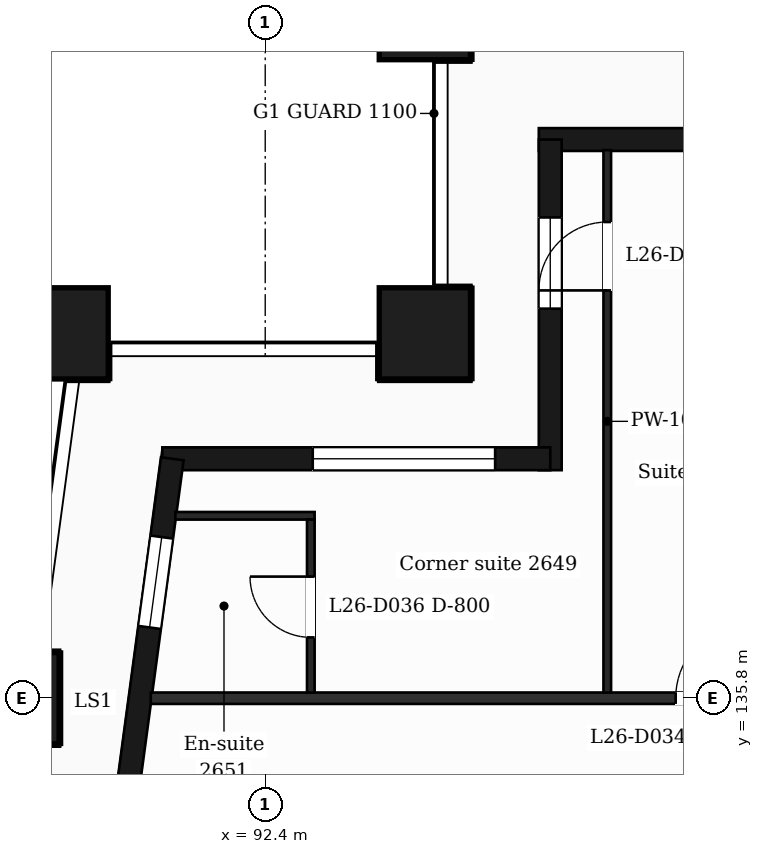
"""IFC4 building model, lengths in metres.
Left out: names, types, materials, properties, quantities, classifications, styles, units other than length and angle.
Written with IfcOpenShell. Run it as: python <this file> out.ifc"""

import sys

from ifc_helpers import new_model, si_unit, direction, frame, frame_2d, origin, origin_2d, place, context, subcontext, project, spatial, rectangle, extrude, element, fill, save


model = new_model("IFC4")
c1 = context("Model", 3, precision=1e-05, world=origin(), true_north=direction((0.0, 1.0)))
c2 = subcontext(c1, "Body", "Model", "MODEL_VIEW")
j1 = project(units=[si_unit("LENGTHUNIT", "METRE"), si_unit("PLANEANGLEUNIT", "RADIAN")], contexts=[c1])
p1 = place(None, origin())
s1 = spatial("IfcSite", under=j1, at=p1, CompositionType="ELEMENT")
p2 = place(p1, origin())
s2 = spatial("IfcBuilding", under=s1, at=p2, CompositionType="ELEMENT")
p3 = place(p2, frame((0.0, 0.0, 113.2)))
s3 = spatial("IfcBuildingStorey", under=s2, at=p3, CompositionType="ELEMENT", Elevation=113.2)
for number, where, z_axis, x_axis in (
    (1, (94.5, 140.6, 0.0), (0.0, 0.0, 1.0), (1.0, 0.0, 0.0)),
    (2, (89.735, 140.6, 0.0), (0.0, 0.0, 1.0), (1.0, 0.0, 0.0)),
    (3, (89.088, 135.8, 0.0), (0.0, 0.0, 1.0), (1.0, 0.0, 0.0)),
    (4, (94.5, 144.8, 0.0), (0.0, 0.0, 1.0), (1.0, 0.0, 0.0)),
):
    element("IfcColumn", number, at=place(p3, frame(where, z_axis=z_axis, x_axis=x_axis)), inside=s3, PredefinedType="COLUMN", context=c2, shape_type="SweptSolid", body=[
        extrude(rectangle(XDim=1.2, YDim=1.2, at=origin_2d()), origin(), (0.0, 0.0, 1.0), 3.7),
    ])
p4 = place(p3, frame((110.4, 143.15, 0.0), z_axis=(0.0, 0.0, 1.0), x_axis=(-1.0, 0.0, 0.0)))
e5 = element("IfcWall", 5, at=p4, inside=s3, PredefinedType="SOLIDWALL", context=c2, shape_type="SweptSolid", body=[
    extrude(rectangle(XDim=14.4, YDim=0.3, at=frame_2d((7.2, 0.0))), origin(), (0.0, 0.0, 1.0), 3.38),
])
p5 = place(p4, frame((2.1, 0.0, 0.9)))
e6 = element("IfcOpeningElement", 6, at=p5, cuts=e5, PredefinedType="OPENING", context=c2, shape_type="SweptSolid", body=[
    extrude(rectangle(XDim=2.4, YDim=2.1, at=frame_2d((1.2, 1.05))), frame((0.0, 0.16, 0.0), z_axis=(0.0, -1.0, 0.0), x_axis=(1.0, 0.0, 0.0)), (0.0, 0.0, 1.0), 0.32),
])
p6 = place(p4, frame((6.9, 0.0, 0.0)))
e7 = element("IfcOpeningElement", 7, at=p6, cuts=e5, PredefinedType="OPENING", context=c2, shape_type="SweptSolid", body=[
    extrude(rectangle(XDim=1.2, YDim=2.4, at=frame_2d((0.6, 1.2))), frame((0.0, 0.16, 0.0), z_axis=(0.0, -1.0, 0.0), x_axis=(1.0, 0.0, 0.0)), (0.0, 0.0, 1.0), 0.32),
])
p7 = place(p4, frame((11.1, 0.0, 0.9)))
e8 = element("IfcOpeningElement", 8, at=p7, cuts=e5, PredefinedType="OPENING", context=c2, shape_type="SweptSolid", body=[
    extrude(rectangle(XDim=1.2, YDim=2.1, at=frame_2d((0.6, 1.05))), frame((0.0, 0.16, 0.0), z_axis=(0.0, -1.0, 0.0), x_axis=(1.0, 0.0, 0.0)), (0.0, 0.0, 1.0), 0.32),
])
p8 = place(p3, frame((96.15, 143.15, 0.0), z_axis=(0.0, 0.0, 1.0), x_axis=(0.0, -1.0, 0.0)))
e9 = element("IfcWall", 9, at=p8, inside=s3, PredefinedType="SOLIDWALL", context=c2, shape_type="SweptSolid", body=[
    extrude(rectangle(XDim=4.35, YDim=0.3, at=frame_2d((2.175, 0.0))), origin(), (0.0, 0.0, 1.0), 3.38),
])
p9 = place(p8, frame((1.025, 0.0, 0.9)))
e10 = element("IfcOpeningElement", 10, at=p9, cuts=e9, PredefinedType="OPENING", context=c2, shape_type="SweptSolid", body=[
    extrude(rectangle(XDim=1.2, YDim=2.1, at=frame_2d((0.6, 1.05))), frame((0.0, 0.16, 0.0), z_axis=(0.0, -1.0, 0.0), x_axis=(1.0, 0.0, 0.0)), (0.0, 0.0, 1.0), 0.32),
])
p10 = place(p3, frame((96.15, 138.95, 0.0), z_axis=(0.0, 0.0, 1.0), x_axis=(-1.0, 0.0, 0.0)))
e11 = element("IfcWall", 11, at=p10, inside=s3, PredefinedType="SOLIDWALL", context=c2, shape_type="SweptSolid", body=[
    extrude(rectangle(XDim=5.104, YDim=0.3, at=frame_2d((2.552, 0.0))), origin(), (0.0, 0.0, 1.0), 3.38),
])
p11 = place(p10, frame((0.725, 0.0, 0.9)))
e12 = element("IfcOpeningElement", 12, at=p11, cuts=e11, PredefinedType="OPENING", context=c2, shape_type="SweptSolid", body=[
    extrude(rectangle(XDim=2.4, YDim=2.1, at=frame_2d((1.2, 1.05))), frame((0.0, 0.16, 0.0), z_axis=(0.0, -1.0, 0.0), x_axis=(1.0, 0.0, 0.0)), (0.0, 0.0, 1.0), 0.32),
])
p12 = place(p3, frame((91.177, 138.95, 0.0), z_axis=(0.0, 0.0, 1.0), x_axis=(-0.133426664613, -0.991058689065, 0.0)))
e13 = element("IfcWall", 13, at=p12, inside=s3, PredefinedType="SOLIDWALL", context=c2, shape_type="SweptSolid", body=[
    extrude(rectangle(XDim=6.609, YDim=0.3, at=frame_2d((3.305, 0.0))), origin(), (0.0, 0.0, 1.0), 3.38),
])
p13 = place(p12, frame((1.039, 0.0, 0.9)))
e14 = element("IfcOpeningElement", 14, at=p13, cuts=e13, PredefinedType="OPENING", context=c2, shape_type="SweptSolid", body=[
    extrude(rectangle(XDim=1.2, YDim=2.1, at=frame_2d((0.6, 1.05))), frame((0.0, 0.16, 0.0), z_axis=(0.0, -1.0, 0.0), x_axis=(1.0, 0.0, 0.0)), (0.0, 0.0, 1.0), 0.32),
])
p14 = place(p12, frame((4.294, 0.0, 0.0)))
e15 = element("IfcOpeningElement", 15, at=p14, cuts=e13, PredefinedType="OPENING", context=c2, shape_type="SweptSolid", body=[
    extrude(rectangle(XDim=1.2, YDim=2.4, at=frame_2d((0.6, 1.2))), frame((0.0, 0.16, 0.0), z_axis=(0.0, -1.0, 0.0), x_axis=(1.0, 0.0, 0.0)), (0.0, 0.0, 1.0), 0.32),
])
p15 = place(p3, frame((90.895, 135.8, 0.0), z_axis=(0.0, 0.0, 1.0), x_axis=(1.0, 0.0, 0.0)))
e16 = element("IfcWall", 16, at=p15, inside=s3, PredefinedType="PARTITIONING", context=c2, shape_type="SweptSolid", body=[
    extrude(rectangle(XDim=45.011, YDim=0.15, at=frame_2d((22.505, 0.0))), origin(), (0.0, 0.0, 1.0), 3.38),
])
p16 = place(p15, frame((6.906, 0.0, 0.0)))
e17 = element("IfcOpeningElement", 17, at=p16, cuts=e16, PredefinedType="OPENING", context=c2, shape_type="SweptSolid", body=[
    extrude(rectangle(XDim=1.0, YDim=2.1, at=frame_2d((0.5, 1.05))), frame((0.0, 0.085, 0.0), z_axis=(0.0, -1.0, 0.0), x_axis=(1.0, 0.0, 0.0)), (0.0, 0.0, 1.0), 0.17),
])
p17 = place(p15, frame((12.13, 0.0, 0.0)))
e18 = element("IfcOpeningElement", 18, at=p17, cuts=e16, PredefinedType="OPENING", context=c2, shape_type="SweptSolid", body=[
    extrude(rectangle(XDim=1.0, YDim=2.1, at=frame_2d((0.5, 1.05))), frame((0.0, 0.085, 0.0), z_axis=(0.0, -1.0, 0.0), x_axis=(1.0, 0.0, 0.0)), (0.0, 0.0, 1.0), 0.17),
])
p18 = place(p15, frame((23.48, 0.0, 0.0)))
e19 = element("IfcOpeningElement", 19, at=p18, cuts=e16, PredefinedType="OPENING", context=c2, shape_type="SweptSolid", body=[
    extrude(rectangle(XDim=1.0, YDim=2.1, at=frame_2d((0.5, 1.05))), frame((0.0, 0.085, 0.0), z_axis=(0.0, -1.0, 0.0), x_axis=(1.0, 0.0, 0.0)), (0.0, 0.0, 1.0), 0.17),
])
p19 = place(p15, frame((27.515, 0.0, 0.0)))
e20 = element("IfcOpeningElement", 20, at=p19, cuts=e16, PredefinedType="OPENING", context=c2, shape_type="SweptSolid", body=[
    extrude(rectangle(XDim=0.95, YDim=2.1, at=frame_2d((0.475, 1.05))), frame((0.0, 0.085, 0.0), z_axis=(0.0, -1.0, 0.0), x_axis=(1.0, 0.0, 0.0)), (0.0, 0.0, 1.0), 0.17),
])
p20 = place(p15, frame((31.18, 0.0, 0.0)))
e21 = element("IfcOpeningElement", 21, at=p20, cuts=e16, PredefinedType="OPENING", context=c2, shape_type="SweptSolid", body=[
    extrude(rectangle(XDim=0.95, YDim=2.1, at=frame_2d((0.475, 1.05))), frame((0.0, 0.085, 0.0), z_axis=(0.0, -1.0, 0.0), x_axis=(1.0, 0.0, 0.0)), (0.0, 0.0, 1.0), 0.17),
])
p21 = place(p15, frame((39.814, 0.0, 0.0)))
e22 = element("IfcOpeningElement", 22, at=p21, cuts=e16, PredefinedType="OPENING", context=c2, shape_type="SweptSolid", body=[
    extrude(rectangle(XDim=0.95, YDim=2.1, at=frame_2d((0.475, 1.05))), frame((0.0, 0.085, 0.0), z_axis=(0.0, -1.0, 0.0), x_axis=(1.0, 0.0, 0.0)), (0.0, 0.0, 1.0), 0.17),
])
p22 = place(p3, frame((91.218, 138.2, 0.0), z_axis=(0.0, 0.0, 1.0), x_axis=(1.0, 0.0, 0.0)))
e23 = element("IfcWall", 23, at=p22, inside=s3, PredefinedType="PARTITIONING", context=c2, shape_type="SweptSolid", body=[
    extrude(rectangle(XDim=1.832, YDim=0.1, at=frame_2d((0.916, 0.0))), origin(), (0.0, 0.0, 1.0), 3.38),
])
p23 = place(p3, frame((93.0, 135.875, 0.0), z_axis=(0.0, 0.0, 1.0), x_axis=(0.0, 1.0, 0.0)))
e24 = element("IfcWall", 24, at=p23, inside=s3, PredefinedType="PARTITIONING", context=c2, shape_type="SweptSolid", body=[
    extrude(rectangle(XDim=2.275, YDim=0.1, at=frame_2d((1.137, 0.0))), origin(), (0.0, 0.0, 1.0), 3.38),
])
p24 = place(p23, frame((0.725, 0.0, 0.0)))
e25 = element("IfcOpeningElement", 25, at=p24, cuts=e24, PredefinedType="OPENING", context=c2, shape_type="SweptSolid", body=[
    extrude(rectangle(XDim=0.8, YDim=2.1, at=frame_2d((0.4, 1.05))), frame((0.0, 0.06, 0.0), z_axis=(0.0, -1.0, 0.0), x_axis=(1.0, 0.0, 0.0)), (0.0, 0.0, 1.0), 0.12),
])
p25 = place(p3, frame((96.9, 135.875, 0.0), z_axis=(0.0, 0.0, 1.0), x_axis=(0.0, 1.0, 0.0)))
e26 = element("IfcWall", 26, at=p25, inside=s3, PredefinedType="PARTITIONING", context=c2, shape_type="SweptSolid", body=[
    extrude(rectangle(XDim=7.135, YDim=0.1, at=frame_2d((3.567, 0.0))), origin(), (0.0, 0.0, 1.0), 3.38),
])
p26 = place(p25, frame((5.29, 0.0, 0.0)))
e27 = element("IfcOpeningElement", 27, at=p26, cuts=e26, PredefinedType="OPENING", context=c2, shape_type="SweptSolid", body=[
    extrude(rectangle(XDim=0.9, YDim=2.1, at=frame_2d((0.45, 1.05))), frame((0.0, 0.06, 0.0), z_axis=(0.0, -1.0, 0.0), x_axis=(1.0, 0.0, 0.0)), (0.0, 0.0, 1.0), 0.12),
])
p27 = place(p9, origin())
e28 = element("IfcWindow", 28, at=p27, inside=s3, PartitioningType="SINGLE_PANEL", PredefinedType="WINDOW", context=c2, shape_type="SweptSolid", body=[
    extrude(rectangle(XDim=1.2, YDim=2.1, at=frame_2d((0.6, 1.05))), frame((0.0, 0.03, 0.0), z_axis=(0.0, -1.0, 0.0), x_axis=(1.0, 0.0, 0.0)), (0.0, 0.0, 1.0), 0.06),
])
fill(e10, e28)
p28 = place(p11, origin())
e29 = element("IfcWindow", 29, at=p28, inside=s3, PartitioningType="SINGLE_PANEL", PredefinedType="WINDOW", context=c2, shape_type="SweptSolid", body=[
    extrude(rectangle(XDim=2.4, YDim=2.1, at=frame_2d((1.2, 1.05))), frame((0.0, 0.03, 0.0), z_axis=(0.0, -1.0, 0.0), x_axis=(1.0, 0.0, 0.0)), (0.0, 0.0, 1.0), 0.06),
])
fill(e12, e29)
p29 = place(p13, origin())
e30 = element("IfcWindow", 30, at=p29, inside=s3, PartitioningType="SINGLE_PANEL", PredefinedType="WINDOW", context=c2, shape_type="SweptSolid", body=[
    extrude(rectangle(XDim=1.2, YDim=2.1, at=frame_2d((0.6, 1.05))), frame((0.0, 0.03, 0.0), z_axis=(0.0, -1.0, 0.0), x_axis=(1.0, 0.0, 0.0)), (0.0, 0.0, 1.0), 0.06),
])
fill(e14, e30)
p30 = place(p16, origin())
e31 = element("IfcDoor", 31, at=p30, inside=s3, OperationType="SINGLE_SWING_RIGHT", PredefinedType="DOOR", context=c2, shape_type="SweptSolid", body=[
    extrude(rectangle(XDim=1.0, YDim=2.1, at=frame_2d((0.5, 1.05))), frame((0.0, 0.025, 0.0), z_axis=(0.0, -1.0, 0.0), x_axis=(1.0, 0.0, 0.0)), (0.0, 0.0, 1.0), 0.05),
])
fill(e17, e31)
p31 = place(p26, origin())
e32 = element("IfcDoor", 32, at=p31, inside=s3, OperationType="SINGLE_SWING_LEFT", PredefinedType="DOOR", context=c2, shape_type="SweptSolid", body=[
    extrude(rectangle(XDim=0.9, YDim=2.1, at=frame_2d((0.45, 1.05))), frame((0.0, 0.025, 0.0), z_axis=(0.0, -1.0, 0.0), x_axis=(1.0, 0.0, 0.0)), (0.0, 0.0, 1.0), 0.05),
])
fill(e27, e32)
p32 = place(p24, origin())
e33 = element("IfcDoor", 33, at=p32, inside=s3, OperationType="SINGLE_SWING_RIGHT", PredefinedType="DOOR", context=c2, shape_type="SweptSolid", body=[
    extrude(rectangle(XDim=0.8, YDim=2.1, at=frame_2d((0.4, 1.05))), frame((0.0, 0.025, 0.0), z_axis=(0.0, -1.0, 0.0), x_axis=(1.0, 0.0, 0.0)), (0.0, 0.0, 1.0), 0.05),
])
fill(e25, e33)
save(model, sys.argv[1])
